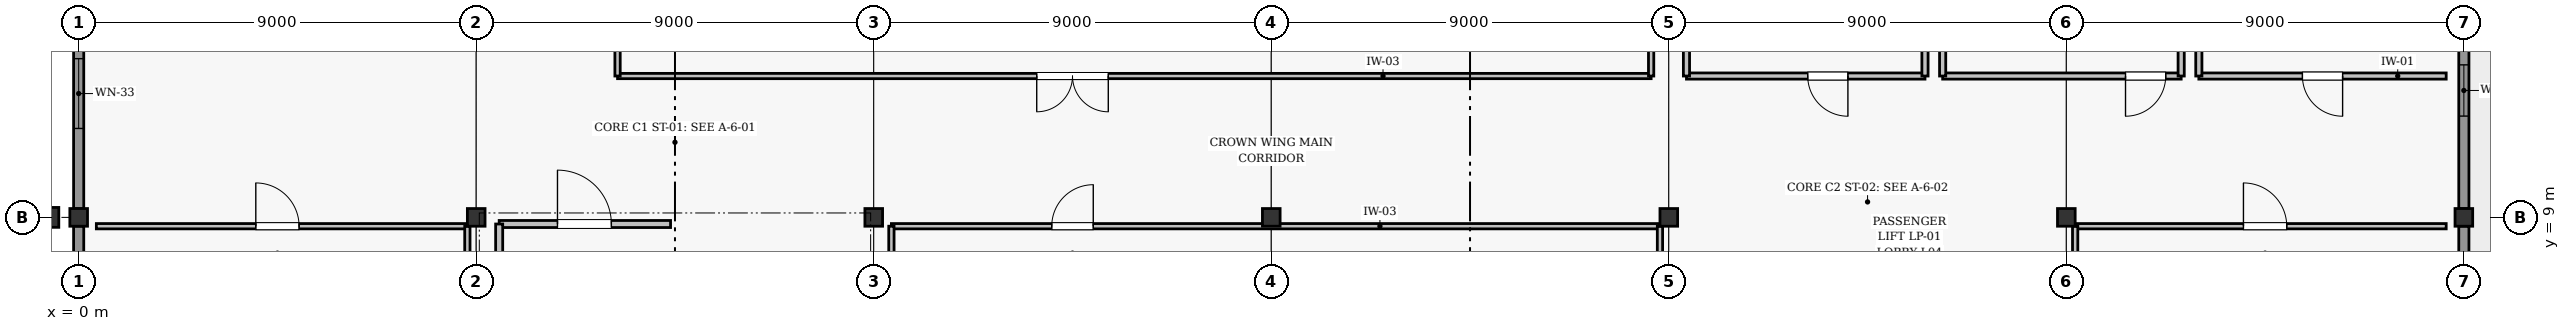
"""IFC4 building model, lengths in metres.
Left out: names, types, materials, properties, quantities, classifications, styles, units other than length and angle.
Written with IfcOpenShell. Run it as: python <this file> out.ifc"""

import sys

from ifc_helpers import new_model, si_unit, direction, frame, frame_2d, origin, origin_2d, place, context, subcontext, project, spatial, rectangle, extrude, element, fill, save


model = new_model("IFC4")
c1 = context("Model", 3, precision=1e-05, world=origin(), true_north=direction((0.0, 1.0)))
c2 = subcontext(c1, "Body", "Model", "MODEL_VIEW")
j1 = project(units=[si_unit("LENGTHUNIT", "METRE"), si_unit("PLANEANGLEUNIT", "RADIAN")], contexts=[c1])
p1 = place(None, origin())
s1 = spatial("IfcSite", under=j1, at=p1, CompositionType="ELEMENT")
p2 = place(p1, origin())
s2 = spatial("IfcBuilding", under=s1, at=p2, CompositionType="ELEMENT")
p3 = place(p2, frame((0.0, 0.0, 15.0)))
s3 = spatial("IfcBuildingStorey", under=s2, at=p3, CompositionType="ELEMENT", Elevation=15.0)
for number, where, z_axis, x_axis in (
    (1, (0.0, 9.0, 0.0), (0.0, 0.0, 1.0), (1.0, 0.0, 0.0)),
    (2, (9.0, 9.0, 0.0), (0.0, 0.0, 1.0), (1.0, 0.0, 0.0)),
    (3, (18.0, 9.0, 0.0), (0.0, 0.0, 1.0), (1.0, 0.0, 0.0)),
    (4, (27.0, 9.0, 0.0), (0.0, 0.0, 1.0), (1.0, 0.0, 0.0)),
    (5, (36.0, 9.0, 0.0), (0.0, 0.0, 1.0), (1.0, 0.0, 0.0)),
    (6, (45.0, 9.0, 0.0), (0.0, 0.0, 1.0), (1.0, 0.0, 0.0)),
    (7, (54.0, 9.0, 0.0), (0.0, 0.0, 1.0), (1.0, 0.0, 0.0)),
):
    element("IfcColumn", number, at=place(p3, frame(where, z_axis=z_axis, x_axis=x_axis)), inside=s3, PredefinedType="COLUMN", context=c2, shape_type="SweptSolid", body=[
        extrude(rectangle(XDim=0.4, YDim=0.4, at=origin_2d()), origin(), (0.0, 0.0, 1.0), 3.0),
    ])
p4 = place(p3, frame((-0.75, 9.0, 0.0), z_axis=(0.0, 0.0, 1.0), x_axis=(0.0, 1.0, 0.0)))
e8 = element("IfcColumn", 8, at=p4, inside=s3, PredefinedType="PILASTER", context=c2, shape_type="SweptSolid", body=[
    extrude(rectangle(XDim=0.45, YDim=0.6, at=origin_2d()), origin(), (0.0, 0.0, 1.0), 3.95),
])
p5 = place(p3, frame((0.0, 0.198, 0.0), z_axis=(0.0, 0.0, 1.0), x_axis=(0.0, 1.0, 0.0)))
e9 = element("IfcWall", 9, at=p5, inside=s3, PredefinedType="SOLIDWALL", context=c2, shape_type="SweptSolid", body=[
    extrude(rectangle(XDim=8.604, YDim=0.23, at=frame_2d((4.302, 0.0))), origin(), (0.0, 0.0, 1.0), 2.242),
])
p6 = place(p5, frame((1.748, 0.0, 0.45)))
e10 = element("IfcOpeningElement", 10, at=p6, cuts=e9, PredefinedType="OPENING", context=c2, shape_type="SweptSolid", body=[
    extrude(rectangle(XDim=1.68, YDim=1.66, at=frame_2d((0.84, 0.83))), frame((0.0, 0.125, 0.0), z_axis=(0.0, -1.0, 0.0), x_axis=(1.0, 0.0, 0.0)), (0.0, 0.0, 1.0), 0.25),
])
p7 = place(p5, frame((5.176, 0.0, 0.45)))
e11 = element("IfcOpeningElement", 11, at=p7, cuts=e9, PredefinedType="OPENING", context=c2, shape_type="SweptSolid", body=[
    extrude(rectangle(XDim=1.68, YDim=1.66, at=frame_2d((0.84, 0.83))), frame((0.0, 0.125, 0.0), z_axis=(0.0, -1.0, 0.0), x_axis=(1.0, 0.0, 0.0)), (0.0, 0.0, 1.0), 0.25),
])
p8 = place(p3, frame((0.0, 9.198, 0.0), z_axis=(0.0, 0.0, 1.0), x_axis=(0.0, 1.0, 0.0)))
e12 = element("IfcWall", 12, at=p8, inside=s3, PredefinedType="SOLIDWALL", context=c2, shape_type="SweptSolid", body=[
    extrude(rectangle(XDim=8.604, YDim=0.23, at=frame_2d((4.302, 0.0))), origin(), (0.0, 0.0, 1.0), 2.242),
])
p9 = place(p8, frame((1.815, 0.0, 0.46)))
e13 = element("IfcOpeningElement", 13, at=p9, cuts=e12, PredefinedType="OPENING", context=c2, shape_type="SweptSolid", body=[
    extrude(rectangle(XDim=1.58, YDim=1.6, at=frame_2d((0.79, 0.8))), frame((0.0, 0.125, 0.0), z_axis=(0.0, -1.0, 0.0), x_axis=(1.0, 0.0, 0.0)), (0.0, 0.0, 1.0), 0.25),
])
p10 = place(p8, frame((5.209, 0.0, 0.46)))
e14 = element("IfcOpeningElement", 14, at=p10, cuts=e12, PredefinedType="OPENING", context=c2, shape_type="SweptSolid", body=[
    extrude(rectangle(XDim=1.58, YDim=1.6, at=frame_2d((0.79, 0.8))), frame((0.0, 0.125, 0.0), z_axis=(0.0, -1.0, 0.0), x_axis=(1.0, 0.0, 0.0)), (0.0, 0.0, 1.0), 0.25),
])
p11 = place(p3, frame((54.0, 0.198, 0.0), z_axis=(0.0, 0.0, 1.0), x_axis=(0.0, 1.0, 0.0)))
e15 = element("IfcWall", 15, at=p11, inside=s3, PredefinedType="SOLIDWALL", context=c2, shape_type="SweptSolid", body=[
    extrude(rectangle(XDim=8.604, YDim=0.23, at=frame_2d((4.302, 0.0))), origin(), (0.0, 0.0, 1.0), 2.242),
])
p12 = place(p11, frame((3.672, 0.0, 0.0)))
e16 = element("IfcOpeningElement", 16, at=p12, cuts=e15, PredefinedType="OPENING", context=c2, shape_type="SweptSolid", body=[
    extrude(rectangle(XDim=1.26, YDim=2.02, at=frame_2d((0.63, 1.01))), frame((0.0, 0.125, 0.0), z_axis=(0.0, -1.0, 0.0), x_axis=(1.0, 0.0, 0.0)), (0.0, 0.0, 1.0), 0.25),
])
p13 = place(p3, frame((54.0, 9.198, 0.0), z_axis=(0.0, 0.0, 1.0), x_axis=(0.0, 1.0, 0.0)))
e17 = element("IfcWall", 17, at=p13, inside=s3, PredefinedType="SOLIDWALL", context=c2, shape_type="SweptSolid", body=[
    extrude(rectangle(XDim=8.604, YDim=0.23, at=frame_2d((4.302, 0.0))), origin(), (0.0, 0.0, 1.0), 2.242),
])
p14 = place(p13, frame((2.095, 0.0, 0.66)))
e18 = element("IfcOpeningElement", 18, at=p14, cuts=e17, PredefinedType="OPENING", context=c2, shape_type="SweptSolid", body=[
    extrude(rectangle(XDim=1.16, YDim=1.4, at=frame_2d((0.58, 0.7))), frame((0.0, 0.125, 0.0), z_axis=(0.0, -1.0, 0.0), x_axis=(1.0, 0.0, 0.0)), (0.0, 0.0, 1.0), 0.25),
])
p15 = place(p13, frame((5.349, 0.0, 0.66)))
e19 = element("IfcOpeningElement", 19, at=p15, cuts=e17, PredefinedType="OPENING", context=c2, shape_type="SweptSolid", body=[
    extrude(rectangle(XDim=1.16, YDim=1.4, at=frame_2d((0.58, 0.7))), frame((0.0, 0.125, 0.0), z_axis=(0.0, -1.0, 0.0), x_axis=(1.0, 0.0, 0.0)), (0.0, 0.0, 1.0), 0.25),
])
p16 = place(p3, frame((9.52, 8.85, 0.0), z_axis=(0.0, 0.0, 1.0), x_axis=(1.0, 0.0, 0.0)))
e20 = element("IfcWall", 20, at=p16, inside=s3, PredefinedType="PARTITIONING", context=c2, shape_type="SweptSolid", body=[
    extrude(rectangle(XDim=3.88, YDim=0.16, at=frame_2d((1.94, 0.0))), origin(), (0.0, 0.0, 1.0), 2.79),
])
p17 = place(p16, frame((1.32, 0.0, 0.0)))
e21 = element("IfcOpeningElement", 21, at=p17, cuts=e20, PredefinedType="OPENING", context=c2, shape_type="SweptSolid", body=[
    extrude(rectangle(XDim=1.22, YDim=2.12, at=frame_2d((0.61, 1.06))), frame((0.0, 0.09, 0.0), z_axis=(0.0, -1.0, 0.0), x_axis=(1.0, 0.0, 0.0)), (0.0, 0.0, 1.0), 0.18),
])
p18 = place(p3, frame((9.52, 3.89, 0.0), z_axis=(0.0, 0.0, 1.0), x_axis=(0.0, 1.0, 0.0)))
e22 = element("IfcWall", 22, at=p18, inside=s3, PredefinedType="PARTITIONING", context=c2, shape_type="SweptSolid", body=[
    extrude(rectangle(XDim=4.96, YDim=0.16, at=frame_2d((2.48, 0.0))), origin(), (0.0, 0.0, 1.0), 2.79),
])
p19 = place(p3, frame((0.4, 8.8, 0.0), z_axis=(0.0, 0.0, 1.0), x_axis=(1.0, 0.0, 0.0)))
e23 = element("IfcWall", 23, at=p19, inside=s3, PredefinedType="PARTITIONING", context=c2, shape_type="SweptSolid", body=[
    extrude(rectangle(XDim=8.4, YDim=0.12, at=frame_2d((4.2, 0.0))), origin(), (0.0, 0.0, 1.0), 2.245),
])
p20 = place(p19, frame((3.61, 0.0, 0.0)))
e24 = element("IfcOpeningElement", 24, at=p20, cuts=e23, PredefinedType="OPENING", context=c2, shape_type="SweptSolid", body=[
    extrude(rectangle(XDim=0.98, YDim=2.08, at=frame_2d((0.49, 1.04))), frame((0.0, 0.07, 0.0), z_axis=(0.0, -1.0, 0.0), x_axis=(1.0, 0.0, 0.0)), (0.0, 0.0, 1.0), 0.14),
])
p21 = place(p3, frame((8.8, 0.4, 0.0), z_axis=(0.0, 0.0, 1.0), x_axis=(0.0, 1.0, 0.0)))
e25 = element("IfcWall", 25, at=p21, inside=s3, PredefinedType="PARTITIONING", context=c2, shape_type="SweptSolid", body=[
    extrude(rectangle(XDim=8.4, YDim=0.12, at=frame_2d((4.2, 0.0))), origin(), (0.0, 0.0, 1.0), 2.245),
])
p22 = place(p3, frame((18.4, 8.8, 0.0), z_axis=(0.0, 0.0, 1.0), x_axis=(1.0, 0.0, 0.0)))
e26 = element("IfcWall", 26, at=p22, inside=s3, PredefinedType="PARTITIONING", context=c2, shape_type="SweptSolid", body=[
    extrude(rectangle(XDim=17.4, YDim=0.12, at=frame_2d((8.7, 0.0))), origin(), (0.0, 0.0, 1.0), 2.245),
])
p23 = place(p22, frame((3.63, 0.0, 0.0)))
e27 = element("IfcOpeningElement", 27, at=p23, cuts=e26, PredefinedType="OPENING", context=c2, shape_type="SweptSolid", body=[
    extrude(rectangle(XDim=0.94, YDim=2.06, at=frame_2d((0.47, 1.03))), frame((0.0, 0.07, 0.0), z_axis=(0.0, -1.0, 0.0), x_axis=(1.0, 0.0, 0.0)), (0.0, 0.0, 1.0), 0.14),
])
p24 = place(p3, frame((18.4, 0.4, 0.0), z_axis=(0.0, 0.0, 1.0), x_axis=(0.0, 1.0, 0.0)))
e28 = element("IfcWall", 28, at=p24, inside=s3, PredefinedType="PARTITIONING", context=c2, shape_type="SweptSolid", body=[
    extrude(rectangle(XDim=8.4, YDim=0.12, at=frame_2d((4.2, 0.0))), origin(), (0.0, 0.0, 1.0), 2.79),
])
p25 = place(p3, frame((35.8, 0.4, 0.0), z_axis=(0.0, 0.0, 1.0), x_axis=(0.0, 1.0, 0.0)))
e29 = element("IfcWall", 29, at=p25, inside=s3, PredefinedType="PARTITIONING", context=c2, shape_type="SweptSolid", body=[
    extrude(rectangle(XDim=8.4, YDim=0.12, at=frame_2d((4.2, 0.0))), origin(), (0.0, 0.0, 1.0), 2.245),
])
p26 = place(p3, frame((45.2, 8.8, 0.0), z_axis=(0.0, 0.0, 1.0), x_axis=(1.0, 0.0, 0.0)))
e30 = element("IfcWall", 30, at=p26, inside=s3, PredefinedType="PARTITIONING", context=c2, shape_type="SweptSolid", body=[
    extrude(rectangle(XDim=8.4, YDim=0.12, at=frame_2d((4.2, 0.0))), origin(), (0.0, 0.0, 1.0), 2.245),
])
p27 = place(p26, frame((3.81, 0.0, 0.0)))
e31 = element("IfcOpeningElement", 31, at=p27, cuts=e30, PredefinedType="OPENING", context=c2, shape_type="SweptSolid", body=[
    extrude(rectangle(XDim=0.98, YDim=2.08, at=frame_2d((0.49, 1.04))), frame((0.0, 0.07, 0.0), z_axis=(0.0, -1.0, 0.0), x_axis=(1.0, 0.0, 0.0)), (0.0, 0.0, 1.0), 0.14),
])
p28 = place(p3, frame((45.2, 0.4, 0.0), z_axis=(0.0, 0.0, 1.0), x_axis=(0.0, 1.0, 0.0)))
e32 = element("IfcWall", 32, at=p28, inside=s3, PredefinedType="PARTITIONING", context=c2, shape_type="SweptSolid", body=[
    extrude(rectangle(XDim=8.4, YDim=0.12, at=frame_2d((4.2, 0.0))), origin(), (0.0, 0.0, 1.0), 2.245),
])
p29 = place(p3, frame((12.2, 12.2, 0.0), z_axis=(0.0, 0.0, 1.0), x_axis=(1.0, 0.0, 0.0)))
e33 = element("IfcWall", 33, at=p29, inside=s3, PredefinedType="PARTITIONING", context=c2, shape_type="SweptSolid", body=[
    extrude(rectangle(XDim=23.4, YDim=0.12, at=frame_2d((11.7, 0.0))), origin(), (0.0, 0.0, 1.0), 2.245),
])
p30 = place(p29, frame((9.49, 0.0, 0.0)))
e34 = element("IfcOpeningElement", 34, at=p30, cuts=e33, PredefinedType="OPENING", context=c2, shape_type="SweptSolid", body=[
    extrude(rectangle(XDim=1.62, YDim=2.14, at=frame_2d((0.81, 1.07))), frame((0.0, 0.07, 0.0), z_axis=(0.0, -1.0, 0.0), x_axis=(1.0, 0.0, 0.0)), (0.0, 0.0, 1.0), 0.14),
])
for number, where, z_axis, x_axis in (
    (35, (12.2, 12.2, 0.0), (0.0, 0.0, 1.0), (0.0, 1.0, 0.0)),
    (36, (35.6, 12.2, 0.0), (0.0, 0.0, 1.0), (0.0, 1.0, 0.0)),
):
    element("IfcWall", number, at=place(p3, frame(where, z_axis=z_axis, x_axis=x_axis)), inside=s3, PredefinedType="PARTITIONING", context=c2, shape_type="SweptSolid", body=[
        extrude(rectangle(XDim=5.4, YDim=0.12, at=frame_2d((2.7, 0.0))), origin(), (0.0, 0.0, 1.0), 2.79),
    ])
p31 = place(p3, frame((36.4, 12.2, 0.0), z_axis=(0.0, 0.0, 1.0), x_axis=(1.0, 0.0, 0.0)))
e37 = element("IfcWall", 37, at=p31, inside=s3, PredefinedType="PARTITIONING", context=c2, shape_type="SweptSolid", body=[
    extrude(rectangle(XDim=5.4, YDim=0.14, at=frame_2d((2.7, 0.0))), origin(), (0.0, 0.0, 1.0), 2.79),
])
p32 = place(p31, frame((2.745, 0.0, 0.0)))
e38 = element("IfcOpeningElement", 38, at=p32, cuts=e37, PredefinedType="OPENING", context=c2, shape_type="SweptSolid", body=[
    extrude(rectangle(XDim=0.91, YDim=2.04, at=frame_2d((0.455, 1.02))), frame((0.0, 0.08, 0.0), z_axis=(0.0, -1.0, 0.0), x_axis=(1.0, 0.0, 0.0)), (0.0, 0.0, 1.0), 0.16),
])
for number, where, z_axis, x_axis in (
    (39, (36.4, 12.2, 0.0), (0.0, 0.0, 1.0), (0.0, 1.0, 0.0)),
    (40, (41.8, 12.2, 0.0), (0.0, 0.0, 1.0), (0.0, 1.0, 0.0)),
):
    element("IfcWall", number, at=place(p3, frame(where, z_axis=z_axis, x_axis=x_axis)), inside=s3, PredefinedType="PARTITIONING", context=c2, shape_type="SweptSolid", body=[
        extrude(rectangle(XDim=5.4, YDim=0.14, at=frame_2d((2.7, 0.0))), origin(), (0.0, 0.0, 1.0), 2.79),
    ])
p33 = place(p3, frame((42.2, 12.2, 0.0), z_axis=(0.0, 0.0, 1.0), x_axis=(1.0, 0.0, 0.0)))
e41 = element("IfcWall", 41, at=p33, inside=s3, PredefinedType="PARTITIONING", context=c2, shape_type="SweptSolid", body=[
    extrude(rectangle(XDim=5.4, YDim=0.14, at=frame_2d((2.7, 0.0))), origin(), (0.0, 0.0, 1.0), 2.245),
])
p34 = place(p33, frame((4.14, 0.0, 0.0)))
e42 = element("IfcOpeningElement", 42, at=p34, cuts=e41, PredefinedType="OPENING", context=c2, shape_type="SweptSolid", body=[
    extrude(rectangle(XDim=0.91, YDim=2.04, at=frame_2d((0.455, 1.02))), frame((0.0, 0.08, 0.0), z_axis=(0.0, -1.0, 0.0), x_axis=(1.0, 0.0, 0.0)), (0.0, 0.0, 1.0), 0.16),
])
for number, where, z_axis, x_axis in (
    (43, (42.2, 12.2, 0.0), (0.0, 0.0, 1.0), (0.0, 1.0, 0.0)),
    (44, (47.6, 12.2, 0.0), (0.0, 0.0, 1.0), (0.0, 1.0, 0.0)),
):
    element("IfcWall", number, at=place(p3, frame(where, z_axis=z_axis, x_axis=x_axis)), inside=s3, PredefinedType="PARTITIONING", context=c2, shape_type="SweptSolid", body=[
        extrude(rectangle(XDim=5.4, YDim=0.14, at=frame_2d((2.7, 0.0))), origin(), (0.0, 0.0, 1.0), 2.79),
    ])
p35 = place(p3, frame((48.0, 12.2, 0.0), z_axis=(0.0, 0.0, 1.0), x_axis=(1.0, 0.0, 0.0)))
e45 = element("IfcWall", 45, at=p35, inside=s3, PredefinedType="PARTITIONING", context=c2, shape_type="SweptSolid", body=[
    extrude(rectangle(XDim=5.6, YDim=0.14, at=frame_2d((2.8, 0.0))), origin(), (0.0, 0.0, 1.0), 2.79),
])
p36 = place(p35, frame((2.345, 0.0, 0.0)))
e46 = element("IfcOpeningElement", 46, at=p36, cuts=e45, PredefinedType="OPENING", context=c2, shape_type="SweptSolid", body=[
    extrude(rectangle(XDim=0.91, YDim=2.04, at=frame_2d((0.455, 1.02))), frame((0.0, 0.08, 0.0), z_axis=(0.0, -1.0, 0.0), x_axis=(1.0, 0.0, 0.0)), (0.0, 0.0, 1.0), 0.16),
])
p37 = place(p3, frame((48.0, 12.2, 0.0), z_axis=(0.0, 0.0, 1.0), x_axis=(0.0, 1.0, 0.0)))
e47 = element("IfcWall", 47, at=p37, inside=s3, PredefinedType="PARTITIONING", context=c2, shape_type="SweptSolid", body=[
    extrude(rectangle(XDim=5.4, YDim=0.14, at=frame_2d((2.7, 0.0))), origin(), (0.0, 0.0, 1.0), 2.79),
])
p38 = place(p9, origin())
e48 = element("IfcWindow", 48, at=p38, inside=s3, PartitioningType="SINGLE_PANEL", PredefinedType="WINDOW", context=c2, shape_type="SweptSolid", body=[
    extrude(rectangle(XDim=1.58, YDim=1.6, at=frame_2d((0.79, 0.8))), frame((0.0, 0.03, 0.0), z_axis=(0.0, -1.0, 0.0), x_axis=(1.0, 0.0, 0.0)), (0.0, 0.0, 1.0), 0.06),
])
fill(e13, e48)
p39 = place(p14, origin())
e49 = element("IfcWindow", 49, at=p39, inside=s3, PartitioningType="SINGLE_PANEL", PredefinedType="WINDOW", context=c2, shape_type="SweptSolid", body=[
    extrude(rectangle(XDim=1.16, YDim=1.4, at=frame_2d((0.58, 0.7))), frame((0.0, 0.03, 0.0), z_axis=(0.0, -1.0, 0.0), x_axis=(1.0, 0.0, 0.0)), (0.0, 0.0, 1.0), 0.06),
])
fill(e18, e49)
p40 = place(p17, origin())
e50 = element("IfcDoor", 50, at=p40, inside=s3, OperationType="SINGLE_SWING_LEFT", PredefinedType="DOOR", context=c2, shape_type="SweptSolid", body=[
    extrude(rectangle(XDim=1.22, YDim=2.12, at=frame_2d((0.61, 1.06))), frame((0.0, 0.025, 0.0), z_axis=(0.0, -1.0, 0.0), x_axis=(1.0, 0.0, 0.0)), (0.0, 0.0, 1.0), 0.05),
])
fill(e21, e50)
p41 = place(p20, origin())
e51 = element("IfcDoor", 51, at=p41, inside=s3, OperationType="SINGLE_SWING_LEFT", PredefinedType="DOOR", context=c2, shape_type="SweptSolid", body=[
    extrude(rectangle(XDim=0.98, YDim=2.08, at=frame_2d((0.49, 1.04))), frame((0.0, 0.025, 0.0), z_axis=(0.0, -1.0, 0.0), x_axis=(1.0, 0.0, 0.0)), (0.0, 0.0, 1.0), 0.05),
])
fill(e24, e51)
p42 = place(p23, origin())
e52 = element("IfcDoor", 52, at=p42, inside=s3, OperationType="SINGLE_SWING_RIGHT", PredefinedType="DOOR", context=c2, shape_type="SweptSolid", body=[
    extrude(rectangle(XDim=0.94, YDim=2.06, at=frame_2d((0.47, 1.03))), frame((0.0, 0.025, 0.0), z_axis=(0.0, -1.0, 0.0), x_axis=(1.0, 0.0, 0.0)), (0.0, 0.0, 1.0), 0.05),
])
fill(e27, e52)
p43 = place(p27, origin())
e53 = element("IfcDoor", 53, at=p43, inside=s3, OperationType="SINGLE_SWING_LEFT", PredefinedType="DOOR", context=c2, shape_type="SweptSolid", body=[
    extrude(rectangle(XDim=0.98, YDim=2.08, at=frame_2d((0.49, 1.04))), frame((0.0, 0.025, 0.0), z_axis=(0.0, -1.0, 0.0), x_axis=(1.0, 0.0, 0.0)), (0.0, 0.0, 1.0), 0.05),
])
fill(e31, e53)
p44 = place(p30, frame((1.62, 0.0, 0.0), z_axis=(0.0, 0.0, 1.0), x_axis=(-1.0, 0.0, 0.0)))
e54 = element("IfcDoor", 54, at=p44, inside=s3, OperationType="DOUBLE_SWING_LEFT", PredefinedType="DOOR", context=c2, shape_type="SweptSolid", body=[
    extrude(rectangle(XDim=1.62, YDim=2.14, at=frame_2d((0.81, 1.07))), frame((0.0, 0.025, 0.0), z_axis=(0.0, -1.0, 0.0), x_axis=(1.0, 0.0, 0.0)), (0.0, 0.0, 1.0), 0.05),
])
fill(e34, e54)
p45 = place(p32, frame((0.91, 0.0, 0.0), z_axis=(0.0, 0.0, 1.0), x_axis=(-1.0, 0.0, 0.0)))
e55 = element("IfcDoor", 55, at=p45, inside=s3, OperationType="SINGLE_SWING_RIGHT", PredefinedType="DOOR", context=c2, shape_type="SweptSolid", body=[
    extrude(rectangle(XDim=0.91, YDim=2.04, at=frame_2d((0.455, 1.02))), frame((0.0, 0.025, 0.0), z_axis=(0.0, -1.0, 0.0), x_axis=(1.0, 0.0, 0.0)), (0.0, 0.0, 1.0), 0.05),
])
fill(e38, e55)
p46 = place(p34, frame((0.91, 0.0, 0.0), z_axis=(0.0, 0.0, 1.0), x_axis=(-1.0, 0.0, 0.0)))
e56 = element("IfcDoor", 56, at=p46, inside=s3, OperationType="SINGLE_SWING_LEFT", PredefinedType="DOOR", context=c2, shape_type="SweptSolid", body=[
    extrude(rectangle(XDim=0.91, YDim=2.04, at=frame_2d((0.455, 1.02))), frame((0.0, 0.025, 0.0), z_axis=(0.0, -1.0, 0.0), x_axis=(1.0, 0.0, 0.0)), (0.0, 0.0, 1.0), 0.05),
])
fill(e42, e56)
p47 = place(p36, frame((0.91, 0.0, 0.0), z_axis=(0.0, 0.0, 1.0), x_axis=(-1.0, 0.0, 0.0)))
e57 = element("IfcDoor", 57, at=p47, inside=s3, OperationType="SINGLE_SWING_RIGHT", PredefinedType="DOOR", context=c2, shape_type="SweptSolid", body=[
    extrude(rectangle(XDim=0.91, YDim=2.04, at=frame_2d((0.455, 1.02))), frame((0.0, 0.025, 0.0), z_axis=(0.0, -1.0, 0.0), x_axis=(1.0, 0.0, 0.0)), (0.0, 0.0, 1.0), 0.05),
])
fill(e46, e57)
save(model, sys.argv[1])
